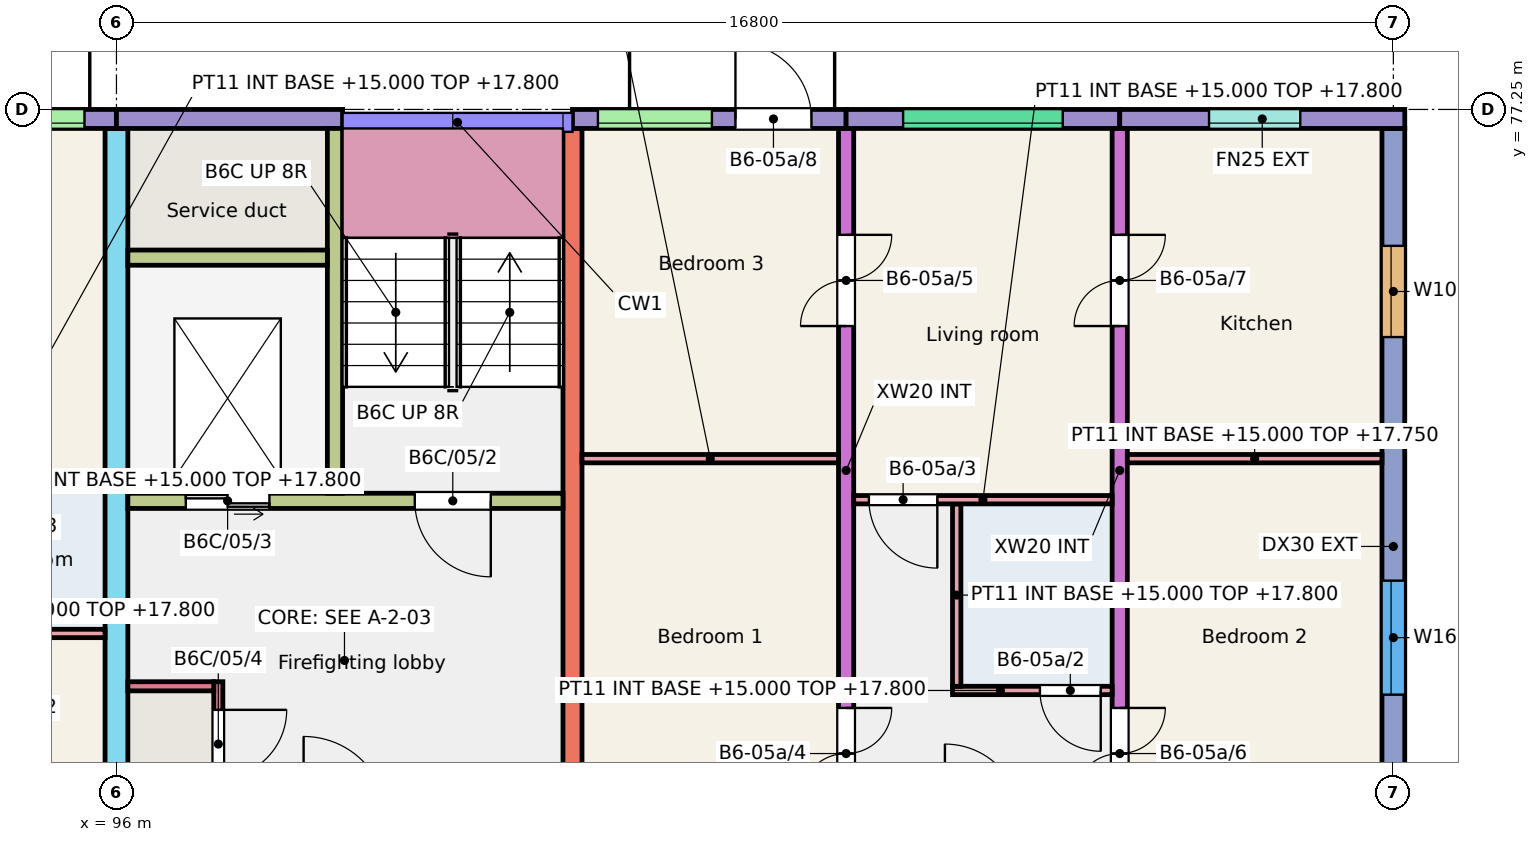
"""IFC4 building model, lengths in metres.
Left out: names, types, materials, properties, quantities, classifications, styles, units other than length and angle.
Written with IfcOpenShell. Run it as: python <this file> out.ifc"""

import sys

from ifc_helpers import new_model, si_unit, direction, frame, frame_2d, origin, place, context, subcontext, project, spatial, rectangle, extrude, element, fill, save


model = new_model("IFC4")
c1 = context("Model", 3, precision=1e-05, world=origin(), true_north=direction((0.0, 1.0)))
c2 = subcontext(c1, "Body", "Model", "MODEL_VIEW")
j1 = project(units=[si_unit("LENGTHUNIT", "METRE"), si_unit("PLANEANGLEUNIT", "RADIAN")], contexts=[c1])
p1 = place(None, origin())
s1 = spatial("IfcSite", under=j1, at=p1, CompositionType="ELEMENT")
p2 = place(p1, origin())
s2 = spatial("IfcBuilding", under=s1, at=p2, CompositionType="ELEMENT")
p3 = place(p2, frame((0.0, 0.0, 15.0)))
s3 = spatial("IfcBuildingStorey", under=s2, at=p3, CompositionType="ELEMENT", Elevation=15.0)
p4 = place(p3, frame((96.0, 66.0, 0.0), z_axis=(0.0, 0.0, 1.0), x_axis=(0.0, 1.0, 0.0)))
e1 = element("IfcWall", 1, at=p4, inside=s3, PredefinedType="SHEAR", context=c2, shape_type="SweptSolid", body=[
    extrude(rectangle(XDim=11.0, YDim=0.3, at=frame_2d((5.5, 0.0))), origin(), (0.0, 0.0, 1.0), 3.0),
])
p5 = place(p4, frame((0.3, 0.0, 0.0)))
e2 = element("IfcOpeningElement", 2, at=p5, cuts=e1, PredefinedType="OPENING", context=c2, shape_type="SweptSolid", body=[
    extrude(rectangle(XDim=1.2, YDim=2.1, at=frame_2d((0.6, 1.05))), frame((0.0, 0.16, 0.0), z_axis=(0.0, -1.0, 0.0), x_axis=(1.0, 0.0, 0.0)), (0.0, 0.0, 1.0), 0.32),
])
p6 = place(p3, frame((102.0, 68.0, 0.0), z_axis=(0.0, 0.0, 1.0), x_axis=(0.0, 1.0, 0.0)))
e3 = element("IfcWall", 3, at=p6, inside=s3, PredefinedType="SHEAR", context=c2, shape_type="SweptSolid", body=[
    extrude(rectangle(XDim=9.0, YDim=0.25, at=frame_2d((4.5, 0.0))), origin(), (0.0, 0.0, 1.0), 3.0),
])
p7 = place(p3, frame((105.6, 68.0, 0.0), z_axis=(0.0, 0.0, 1.0), x_axis=(0.0, 1.0, 0.0)))
e4 = element("IfcWall", 4, at=p7, inside=s3, PredefinedType="SHEAR", context=c2, shape_type="SweptSolid", body=[
    extrude(rectangle(XDim=9.0, YDim=0.2, at=frame_2d((4.5, 0.0))), origin(), (0.0, 0.0, 1.0), 3.0),
])
p8 = place(p7, frame((0.175, 0.0, 0.0)))
e5 = element("IfcOpeningElement", 5, at=p8, cuts=e4, PredefinedType="OPENING", context=c2, shape_type="SweptSolid", body=[
    extrude(rectangle(XDim=1.2, YDim=2.1, at=frame_2d((0.6, 1.05))), frame((0.0, 0.11, 0.0), z_axis=(0.0, -1.0, 0.0), x_axis=(1.0, 0.0, 0.0)), (0.0, 0.0, 1.0), 0.22),
])
p9 = place(p7, frame((6.4, 0.0, 0.0)))
e6 = element("IfcOpeningElement", 6, at=p9, cuts=e4, PredefinedType="OPENING", context=c2, shape_type="SweptSolid", body=[
    extrude(rectangle(XDim=1.2, YDim=2.1, at=frame_2d((0.6, 1.05))), frame((0.0, 0.11, 0.0), z_axis=(0.0, -1.0, 0.0), x_axis=(1.0, 0.0, 0.0)), (0.0, 0.0, 1.0), 0.22),
])
p10 = place(p3, frame((109.2, 68.0, 0.0), z_axis=(0.0, 0.0, 1.0), x_axis=(0.0, 1.0, 0.0)))
e7 = element("IfcWall", 7, at=p10, inside=s3, PredefinedType="SHEAR", context=c2, shape_type="SweptSolid", body=[
    extrude(rectangle(XDim=9.0, YDim=0.2, at=frame_2d((4.5, 0.0))), origin(), (0.0, 0.0, 1.0), 3.0),
])
p11 = place(p10, frame((0.175, 0.0, 0.0)))
e8 = element("IfcOpeningElement", 8, at=p11, cuts=e7, PredefinedType="OPENING", context=c2, shape_type="SweptSolid", body=[
    extrude(rectangle(XDim=1.2, YDim=2.1, at=frame_2d((0.6, 1.05))), frame((0.0, 0.11, 0.0), z_axis=(0.0, -1.0, 0.0), x_axis=(1.0, 0.0, 0.0)), (0.0, 0.0, 1.0), 0.22),
])
p12 = place(p10, frame((6.4, 0.0, 0.0)))
e9 = element("IfcOpeningElement", 9, at=p12, cuts=e7, PredefinedType="OPENING", context=c2, shape_type="SweptSolid", body=[
    extrude(rectangle(XDim=1.2, YDim=2.1, at=frame_2d((0.6, 1.05))), frame((0.0, 0.11, 0.0), z_axis=(0.0, -1.0, 0.0), x_axis=(1.0, 0.0, 0.0)), (0.0, 0.0, 1.0), 0.22),
])
p13 = place(p3, frame((112.8, 66.0, 0.0), z_axis=(0.0, 0.0, 1.0), x_axis=(0.0, 1.0, 0.0)))
e10 = element("IfcWall", 10, at=p13, inside=s3, PredefinedType="SHEAR", context=c2, shape_type="SweptSolid", body=[
    extrude(rectangle(XDim=11.0, YDim=0.3, at=frame_2d((5.5, 0.0))), origin(), (0.0, 0.0, 1.0), 3.0),
])
p14 = place(p13, frame((3.55, 0.0, 0.9)))
e11 = element("IfcOpeningElement", 11, at=p14, cuts=e10, PredefinedType="OPENING", context=c2, shape_type="SweptSolid", body=[
    extrude(rectangle(XDim=1.5, YDim=1.5, at=frame_2d((0.75, 0.75))), frame((0.0, 0.16, 0.0), z_axis=(0.0, -1.0, 0.0), x_axis=(1.0, 0.0, 0.0)), (0.0, 0.0, 1.0), 0.32),
])
p15 = place(p13, frame((8.255, 0.0, 0.9)))
e12 = element("IfcOpeningElement", 12, at=p15, cuts=e10, PredefinedType="OPENING", context=c2, shape_type="SweptSolid", body=[
    extrude(rectangle(XDim=1.2, YDim=1.5, at=frame_2d((0.6, 0.75))), frame((0.0, 0.16, 0.0), z_axis=(0.0, -1.0, 0.0), x_axis=(1.0, 0.0, 0.0)), (0.0, 0.0, 1.0), 0.32),
])
p16 = place(p3, frame((92.4, 77.125, 0.0), z_axis=(0.0, 0.0, 1.0), x_axis=(1.0, 0.0, 0.0)))
e13 = element("IfcWall", 13, at=p16, inside=s3, PredefinedType="SOLIDWALL", context=c2, shape_type="SweptSolid", body=[
    extrude(rectangle(XDim=3.6, YDim=0.25, at=frame_2d((1.8, 0.0))), origin(), (0.0, 0.0, 1.0), 3.0),
])
p17 = place(p16, frame((1.679, 0.0, 1.2)))
e14 = element("IfcOpeningElement", 14, at=p17, cuts=e13, PredefinedType="OPENING", context=c2, shape_type="SweptSolid", body=[
    extrude(rectangle(XDim=1.5, YDim=1.2, at=frame_2d((0.75, 0.6))), frame((0.0, 0.135, 0.0), z_axis=(0.0, -1.0, 0.0), x_axis=(1.0, 0.0, 0.0)), (0.0, 0.0, 1.0), 0.27),
])
p18 = place(p16, frame((0.309, 0.0, 0.0)))
e15 = element("IfcOpeningElement", 15, at=p18, cuts=e13, PredefinedType="OPENING", context=c2, shape_type="SweptSolid", body=[
    extrude(rectangle(XDim=1.0, YDim=2.1, at=frame_2d((0.5, 1.05))), frame((0.0, 0.135, 0.0), z_axis=(0.0, -1.0, 0.0), x_axis=(1.0, 0.0, 0.0)), (0.0, 0.0, 1.0), 0.27),
])
p19 = place(p3, frame((96.0, 77.125, 0.0), z_axis=(0.0, 0.0, 1.0), x_axis=(1.0, 0.0, 0.0)))
e16 = element("IfcWall", 16, at=p19, inside=s3, PredefinedType="SOLIDWALL", context=c2, shape_type="SweptSolid", body=[
    extrude(rectangle(XDim=2.975, YDim=0.25, at=frame_2d((1.488, 0.0))), origin(), (0.0, 0.0, 1.0), 3.0),
])
p20 = place(p3, frame((96.15, 72.1, 0.0), z_axis=(0.0, 0.0, 1.0), x_axis=(1.0, 0.0, 0.0)))
e17 = element("IfcWall", 17, at=p20, inside=s3, PredefinedType="SHEAR", context=c2, shape_type="SweptSolid", body=[
    extrude(rectangle(XDim=5.725, YDim=0.2, at=frame_2d((2.863, 0.0))), origin(), (0.0, 0.0, 1.0), 3.0),
])
p21 = place(p20, frame((3.775, 0.0, 0.0)))
e18 = element("IfcOpeningElement", 18, at=p21, cuts=e17, PredefinedType="OPENING", context=c2, shape_type="SweptSolid", body=[
    extrude(rectangle(XDim=1.0, YDim=2.1, at=frame_2d((0.5, 1.05))), frame((0.0, 0.11, 0.0), z_axis=(0.0, -1.0, 0.0), x_axis=(1.0, 0.0, 0.0)), (0.0, 0.0, 1.0), 0.22),
])
p22 = place(p20, frame((0.762, 0.0, 0.0)))
e19 = element("IfcOpeningElement", 19, at=p22, cuts=e17, PredefinedType="OPENING", context=c2, shape_type="SweptSolid", body=[
    extrude(rectangle(XDim=1.1, YDim=2.1, at=frame_2d((0.55, 1.05))), frame((0.0, 0.11, 0.0), z_axis=(0.0, -1.0, 0.0), x_axis=(1.0, 0.0, 0.0)), (0.0, 0.0, 1.0), 0.22),
])
p23 = place(p3, frame((98.875, 72.2, 0.0), z_axis=(0.0, 0.0, 1.0), x_axis=(0.0, 1.0, 0.0)))
e20 = element("IfcWall", 20, at=p23, inside=s3, PredefinedType="SHEAR", context=c2, shape_type="SweptSolid", body=[
    extrude(rectangle(XDim=4.8, YDim=0.2, at=frame_2d((2.4, 0.0))), origin(), (0.0, 0.0, 1.0), 3.0),
])
p24 = place(p3, frame((96.15, 75.3, 0.0), z_axis=(0.0, 0.0, 1.0), x_axis=(1.0, 0.0, 0.0)))
e21 = element("IfcWall", 21, at=p24, inside=s3, PredefinedType="SHEAR", context=c2, shape_type="SweptSolid", body=[
    extrude(rectangle(XDim=2.625, YDim=0.2, at=frame_2d((1.312, 0.0))), origin(), (0.0, 0.0, 1.0), 3.0),
])
p25 = place(p3, frame((97.34, 68.0, 0.0), z_axis=(0.0, 0.0, 1.0), x_axis=(0.0, 1.0, 0.0)))
e22 = element("IfcWall", 22, at=p25, inside=s3, PredefinedType="SHEAR", context=c2, shape_type="SweptSolid", body=[
    extrude(rectangle(XDim=1.72, YDim=0.12, at=frame_2d((0.86, 0.0))), origin(), (0.0, 0.0, 1.0), 3.0),
])
p26 = place(p25, frame((0.45, 0.0, 0.0)))
e23 = element("IfcOpeningElement", 23, at=p26, cuts=e22, PredefinedType="OPENING", context=c2, shape_type="SweptSolid", body=[
    extrude(rectangle(XDim=0.9, YDim=2.1, at=frame_2d((0.45, 1.05))), frame((0.0, 0.07, 0.0), z_axis=(0.0, -1.0, 0.0), x_axis=(1.0, 0.0, 0.0)), (0.0, 0.0, 1.0), 0.14),
])
p27 = place(p3, frame((96.15, 69.66, 0.0), z_axis=(0.0, 0.0, 1.0), x_axis=(1.0, 0.0, 0.0)))
e24 = element("IfcWall", 24, at=p27, inside=s3, PredefinedType="SHEAR", context=c2, shape_type="SweptSolid", body=[
    extrude(rectangle(XDim=1.13, YDim=0.12, at=frame_2d((0.565, 0.0))), origin(), (0.0, 0.0, 1.0), 3.0),
])
p28 = place(p3, frame((102.0, 77.125, 0.0), z_axis=(0.0, 0.0, 1.0), x_axis=(1.0, 0.0, 0.0)))
e25 = element("IfcWall", 25, at=p28, inside=s3, PredefinedType="SOLIDWALL", context=c2, shape_type="SweptSolid", body=[
    extrude(rectangle(XDim=3.6, YDim=0.25, at=frame_2d((1.8, 0.0))), origin(), (0.0, 0.0, 1.0), 3.0),
])
p29 = place(p28, frame((0.334, 0.0, 1.2)))
e26 = element("IfcOpeningElement", 26, at=p29, cuts=e25, PredefinedType="OPENING", context=c2, shape_type="SweptSolid", body=[
    extrude(rectangle(XDim=1.5, YDim=1.2, at=frame_2d((0.75, 0.6))), frame((0.0, 0.135, 0.0), z_axis=(0.0, -1.0, 0.0), x_axis=(1.0, 0.0, 0.0)), (0.0, 0.0, 1.0), 0.27),
])
p30 = place(p28, frame((2.144, 0.0, 0.0)))
e27 = element("IfcOpeningElement", 27, at=p30, cuts=e25, PredefinedType="OPENING", context=c2, shape_type="SweptSolid", body=[
    extrude(rectangle(XDim=1.0, YDim=2.1, at=frame_2d((0.5, 1.05))), frame((0.0, 0.135, 0.0), z_axis=(0.0, -1.0, 0.0), x_axis=(1.0, 0.0, 0.0)), (0.0, 0.0, 1.0), 0.27),
])
p31 = place(p3, frame((105.6, 77.125, 0.0), z_axis=(0.0, 0.0, 1.0), x_axis=(1.0, 0.0, 0.0)))
e28 = element("IfcWall", 28, at=p31, inside=s3, PredefinedType="SOLIDWALL", context=c2, shape_type="SweptSolid", body=[
    extrude(rectangle(XDim=3.6, YDim=0.25, at=frame_2d((1.8, 0.0))), origin(), (0.0, 0.0, 1.0), 3.0),
])
p32 = place(p31, frame((0.75, 0.0, 1.2)))
e29 = element("IfcOpeningElement", 29, at=p32, cuts=e28, PredefinedType="OPENING", context=c2, shape_type="SweptSolid", body=[
    extrude(rectangle(XDim=2.1, YDim=1.2, at=frame_2d((1.05, 0.6))), frame((0.0, 0.135, 0.0), z_axis=(0.0, -1.0, 0.0), x_axis=(1.0, 0.0, 0.0)), (0.0, 0.0, 1.0), 0.27),
])
p33 = place(p3, frame((109.2, 77.125, 0.0), z_axis=(0.0, 0.0, 1.0), x_axis=(1.0, 0.0, 0.0)))
e30 = element("IfcWall", 30, at=p33, inside=s3, PredefinedType="SOLIDWALL", context=c2, shape_type="SweptSolid", body=[
    extrude(rectangle(XDim=3.75, YDim=0.25, at=frame_2d((1.875, 0.0))), origin(), (0.0, 0.0, 1.0), 3.0),
])
p34 = place(p33, frame((1.175, 0.0, 1.1)))
e31 = element("IfcOpeningElement", 31, at=p34, cuts=e30, PredefinedType="OPENING", context=c2, shape_type="SweptSolid", body=[
    extrude(rectangle(XDim=1.2, YDim=1.3, at=frame_2d((0.6, 0.65))), frame((0.0, 0.135, 0.0), z_axis=(0.0, -1.0, 0.0), x_axis=(1.0, 0.0, 0.0)), (0.0, 0.0, 1.0), 0.27),
])
p35 = place(p3, frame((93.91, 70.355, 0.0), z_axis=(0.0, 0.0, 1.0), x_axis=(1.0, 0.0, 0.0)))
e32 = element("IfcWall", 32, at=p35, inside=s3, PredefinedType="PARTITIONING", context=c2, shape_type="SweptSolid", body=[
    extrude(rectangle(XDim=1.94, YDim=0.11, at=frame_2d((0.97, 0.0))), origin(), (0.0, 0.0, 1.0), 2.8),
])
p36 = place(p3, frame((92.5, 72.355, 0.0), z_axis=(0.0, 0.0, 1.0), x_axis=(1.0, 0.0, 0.0)))
e33 = element("IfcWall", 33, at=p36, inside=s3, PredefinedType="PARTITIONING", context=c2, shape_type="SweptSolid", body=[
    extrude(rectangle(XDim=3.35, YDim=0.11, at=frame_2d((1.675, 0.0))), origin(), (0.0, 0.0, 1.0), 2.8),
])
p37 = place(p36, frame((0.2, 0.0, 0.0)))
e34 = element("IfcOpeningElement", 34, at=p37, cuts=e33, PredefinedType="OPENING", context=c2, shape_type="SweptSolid", body=[
    extrude(rectangle(XDim=0.9, YDim=2.1, at=frame_2d((0.45, 1.05))), frame((0.0, 0.065, 0.0), z_axis=(0.0, -1.0, 0.0), x_axis=(1.0, 0.0, 0.0)), (0.0, 0.0, 1.0), 0.13),
])
p38 = place(p3, frame((107.0, 69.605, 0.0), z_axis=(0.0, 0.0, 1.0), x_axis=(1.0, 0.0, 0.0)))
e35 = element("IfcWall", 35, at=p38, inside=s3, PredefinedType="PARTITIONING", context=c2, shape_type="SweptSolid", body=[
    extrude(rectangle(XDim=2.1, YDim=0.11, at=frame_2d((1.05, 0.0))), origin(), (0.0, 0.0, 1.0), 2.8),
])
p39 = place(p38, frame((1.15, 0.0, 0.0)))
e36 = element("IfcOpeningElement", 36, at=p39, cuts=e35, PredefinedType="OPENING", context=c2, shape_type="SweptSolid", body=[
    extrude(rectangle(XDim=0.8, YDim=2.1, at=frame_2d((0.4, 1.05))), frame((0.0, 0.065, 0.0), z_axis=(0.0, -1.0, 0.0), x_axis=(1.0, 0.0, 0.0)), (0.0, 0.0, 1.0), 0.13),
])
p40 = place(p3, frame((107.055, 69.66, 0.0), z_axis=(0.0, 0.0, 1.0), x_axis=(0.0, 1.0, 0.0)))
e37 = element("IfcWall", 37, at=p40, inside=s3, PredefinedType="PARTITIONING", context=c2, shape_type="SweptSolid", body=[
    extrude(rectangle(XDim=2.4, YDim=0.11, at=frame_2d((1.2, 0.0))), origin(), (0.0, 0.0, 1.0), 2.8),
])
p41 = place(p3, frame((105.7, 72.115, 0.0), z_axis=(0.0, 0.0, 1.0), x_axis=(1.0, 0.0, 0.0)))
e38 = element("IfcWall", 38, at=p41, inside=s3, PredefinedType="PARTITIONING", context=c2, shape_type="SweptSolid", body=[
    extrude(rectangle(XDim=3.4, YDim=0.11, at=frame_2d((1.7, 0.0))), origin(), (0.0, 0.0, 1.0), 2.8),
])
p42 = place(p41, frame((0.2, 0.0, 0.0)))
e39 = element("IfcOpeningElement", 39, at=p42, cuts=e38, PredefinedType="OPENING", context=c2, shape_type="SweptSolid", body=[
    extrude(rectangle(XDim=0.9, YDim=2.1, at=frame_2d((0.45, 1.05))), frame((0.0, 0.065, 0.0), z_axis=(0.0, -1.0, 0.0), x_axis=(1.0, 0.0, 0.0)), (0.0, 0.0, 1.0), 0.13),
])
p43 = place(p3, frame((102.125, 72.655, 0.0), z_axis=(0.0, 0.0, 1.0), x_axis=(1.0, 0.0, 0.0)))
e40 = element("IfcWall", 40, at=p43, inside=s3, PredefinedType="PARTITIONING", context=c2, shape_type="SweptSolid", body=[
    extrude(rectangle(XDim=3.375, YDim=0.11, at=frame_2d((1.688, 0.0))), origin(), (0.0, 0.0, 1.0), 2.8),
])
p44 = place(p3, frame((109.3, 72.655, 0.0), z_axis=(0.0, 0.0, 1.0), x_axis=(1.0, 0.0, 0.0)))
e41 = element("IfcWall", 41, at=p44, inside=s3, PredefinedType="PARTITIONING", context=c2, shape_type="SweptSolid", body=[
    extrude(rectangle(XDim=3.35, YDim=0.11, at=frame_2d((1.675, 0.0))), origin(), (0.0, 0.0, 1.0), 2.75),
])
p45 = place(p17, origin())
e42 = element("IfcWindow", 42, at=p45, inside=s3, PartitioningType="SINGLE_PANEL", PredefinedType="WINDOW", context=c2, shape_type="SweptSolid", body=[
    extrude(rectangle(XDim=1.5, YDim=1.2, at=frame_2d((0.75, 0.6))), frame((0.0, -0.025, 0.0), z_axis=(0.0, -1.0, 0.0), x_axis=(1.0, 0.0, 0.0)), (0.0, 0.0, 1.0), 0.06),
])
fill(e14, e42)
p46 = place(p29, origin())
e43 = element("IfcWindow", 43, at=p46, inside=s3, PartitioningType="SINGLE_PANEL", PredefinedType="WINDOW", context=c2, shape_type="SweptSolid", body=[
    extrude(rectangle(XDim=1.5, YDim=1.2, at=frame_2d((0.75, 0.6))), frame((0.0, -0.025, 0.0), z_axis=(0.0, -1.0, 0.0), x_axis=(1.0, 0.0, 0.0)), (0.0, 0.0, 1.0), 0.06),
])
fill(e26, e43)
p47 = place(p34, origin())
e44 = element("IfcWindow", 44, at=p47, inside=s3, PartitioningType="SINGLE_PANEL", PredefinedType="WINDOW", context=c2, shape_type="SweptSolid", body=[
    extrude(rectangle(XDim=1.2, YDim=1.3, at=frame_2d((0.6, 0.65))), frame((0.0, -0.025, 0.0), z_axis=(0.0, -1.0, 0.0), x_axis=(1.0, 0.0, 0.0)), (0.0, 0.0, 1.0), 0.06),
])
fill(e31, e44)
p48 = place(p32, origin())
e45 = element("IfcWindow", 45, at=p48, inside=s3, PartitioningType="SINGLE_PANEL", PredefinedType="WINDOW", context=c2, shape_type="SweptSolid", body=[
    extrude(rectangle(XDim=2.1, YDim=1.2, at=frame_2d((1.05, 0.6))), frame((0.0, -0.025, 0.0), z_axis=(0.0, -1.0, 0.0), x_axis=(1.0, 0.0, 0.0)), (0.0, 0.0, 1.0), 0.06),
])
fill(e29, e45)
p49 = place(p14, origin())
e46 = element("IfcWindow", 46, at=p49, inside=s3, PartitioningType="SINGLE_PANEL", PredefinedType="WINDOW", context=c2, shape_type="SweptSolid", body=[
    extrude(rectangle(XDim=1.5, YDim=1.5, at=frame_2d((0.75, 0.75))), frame((0.0, 0.06, 0.0), z_axis=(0.0, -1.0, 0.0), x_axis=(1.0, 0.0, 0.0)), (0.0, 0.0, 1.0), 0.06),
])
fill(e11, e46)
p50 = place(p15, origin())
e47 = element("IfcWindow", 47, at=p50, inside=s3, PartitioningType="SINGLE_PANEL", PredefinedType="WINDOW", context=c2, shape_type="SweptSolid", body=[
    extrude(rectangle(XDim=1.2, YDim=1.5, at=frame_2d((0.6, 0.75))), frame((0.0, 0.06, 0.0), z_axis=(0.0, -1.0, 0.0), x_axis=(1.0, 0.0, 0.0)), (0.0, 0.0, 1.0), 0.06),
])
fill(e12, e47)
p51 = place(p39, origin())
e48 = element("IfcDoor", 48, at=p51, inside=s3, OperationType="SINGLE_SWING_RIGHT", PredefinedType="DOOR", context=c2, shape_type="SweptSolid", body=[
    extrude(rectangle(XDim=0.8, YDim=2.1, at=frame_2d((0.4, 1.05))), frame((0.0, 0.025, 0.0), z_axis=(0.0, -1.0, 0.0), x_axis=(1.0, 0.0, 0.0)), (0.0, 0.0, 1.0), 0.05),
])
fill(e36, e48)
p52 = place(p42, origin())
e49 = element("IfcDoor", 49, at=p52, inside=s3, OperationType="SINGLE_SWING_RIGHT", PredefinedType="DOOR", context=c2, shape_type="SweptSolid", body=[
    extrude(rectangle(XDim=0.9, YDim=2.1, at=frame_2d((0.45, 1.05))), frame((0.0, 0.025, 0.0), z_axis=(0.0, -1.0, 0.0), x_axis=(1.0, 0.0, 0.0)), (0.0, 0.0, 1.0), 0.05),
])
fill(e39, e49)
p53 = place(p8, origin())
e50 = element("IfcDoor", 50, at=p53, inside=s3, OperationType="DOUBLE_DOOR_SINGLE_SWING", PredefinedType="DOOR", context=c2, shape_type="SweptSolid", body=[
    extrude(rectangle(XDim=1.2, YDim=2.1, at=frame_2d((0.6, 1.05))), frame((0.0, 0.025, 0.0), z_axis=(0.0, -1.0, 0.0), x_axis=(1.0, 0.0, 0.0)), (0.0, 0.0, 1.0), 0.05),
])
fill(e5, e50)
p54 = place(p9, origin())
e51 = element("IfcDoor", 51, at=p54, inside=s3, OperationType="DOUBLE_DOOR_SINGLE_SWING", PredefinedType="DOOR", context=c2, shape_type="SweptSolid", body=[
    extrude(rectangle(XDim=1.2, YDim=2.1, at=frame_2d((0.6, 1.05))), frame((0.0, 0.025, 0.0), z_axis=(0.0, -1.0, 0.0), x_axis=(1.0, 0.0, 0.0)), (0.0, 0.0, 1.0), 0.05),
])
fill(e6, e51)
p55 = place(p11, origin())
e52 = element("IfcDoor", 52, at=p55, inside=s3, OperationType="DOUBLE_DOOR_SINGLE_SWING", PredefinedType="DOOR", context=c2, shape_type="SweptSolid", body=[
    extrude(rectangle(XDim=1.2, YDim=2.1, at=frame_2d((0.6, 1.05))), frame((0.0, 0.025, 0.0), z_axis=(0.0, -1.0, 0.0), x_axis=(1.0, 0.0, 0.0)), (0.0, 0.0, 1.0), 0.05),
])
fill(e8, e52)
p56 = place(p12, origin())
e53 = element("IfcDoor", 53, at=p56, inside=s3, OperationType="DOUBLE_DOOR_SINGLE_SWING", PredefinedType="DOOR", context=c2, shape_type="SweptSolid", body=[
    extrude(rectangle(XDim=1.2, YDim=2.1, at=frame_2d((0.6, 1.05))), frame((0.0, 0.025, 0.0), z_axis=(0.0, -1.0, 0.0), x_axis=(1.0, 0.0, 0.0)), (0.0, 0.0, 1.0), 0.05),
])
fill(e9, e53)
p57 = place(p30, origin())
e54 = element("IfcDoor", 54, at=p57, inside=s3, OperationType="SINGLE_SWING_LEFT", PredefinedType="DOOR", context=c2, shape_type="SweptSolid", body=[
    extrude(rectangle(XDim=1.0, YDim=2.1, at=frame_2d((0.5, 1.05))), frame((0.0, 0.025, 0.0), z_axis=(0.0, -1.0, 0.0), x_axis=(1.0, 0.0, 0.0)), (0.0, 0.0, 1.0), 0.05),
])
fill(e27, e54)
p58 = place(p21, origin())
e55 = element("IfcDoor", 55, at=p58, inside=s3, OperationType="SINGLE_SWING_RIGHT", PredefinedType="DOOR", context=c2, shape_type="SweptSolid", body=[
    extrude(rectangle(XDim=1.0, YDim=2.1, at=frame_2d((0.5, 1.05))), frame((0.0, 0.025, 0.0), z_axis=(0.0, -1.0, 0.0), x_axis=(1.0, 0.0, 0.0)), (0.0, 0.0, 1.0), 0.05),
])
fill(e18, e55)
p59 = place(p22, origin())
e56 = element("IfcDoor", 56, at=p59, inside=s3, OperationType="DOUBLE_DOOR_SLIDING", PredefinedType="DOOR", context=c2, shape_type="SweptSolid", body=[
    extrude(rectangle(XDim=1.1, YDim=2.1, at=frame_2d((0.55, 1.05))), frame((0.0, 0.025, 0.0), z_axis=(0.0, -1.0, 0.0), x_axis=(1.0, 0.0, 0.0)), (0.0, 0.0, 1.0), 0.05),
])
fill(e19, e56)
p60 = place(p26, origin())
e57 = element("IfcDoor", 57, at=p60, inside=s3, OperationType="SINGLE_SWING_RIGHT", PredefinedType="DOOR", context=c2, shape_type="SweptSolid", body=[
    extrude(rectangle(XDim=0.9, YDim=2.1, at=frame_2d((0.45, 1.05))), frame((0.0, 0.025, 0.0), z_axis=(0.0, -1.0, 0.0), x_axis=(1.0, 0.0, 0.0)), (0.0, 0.0, 1.0), 0.05),
])
fill(e23, e57)
save(model, sys.argv[1])
